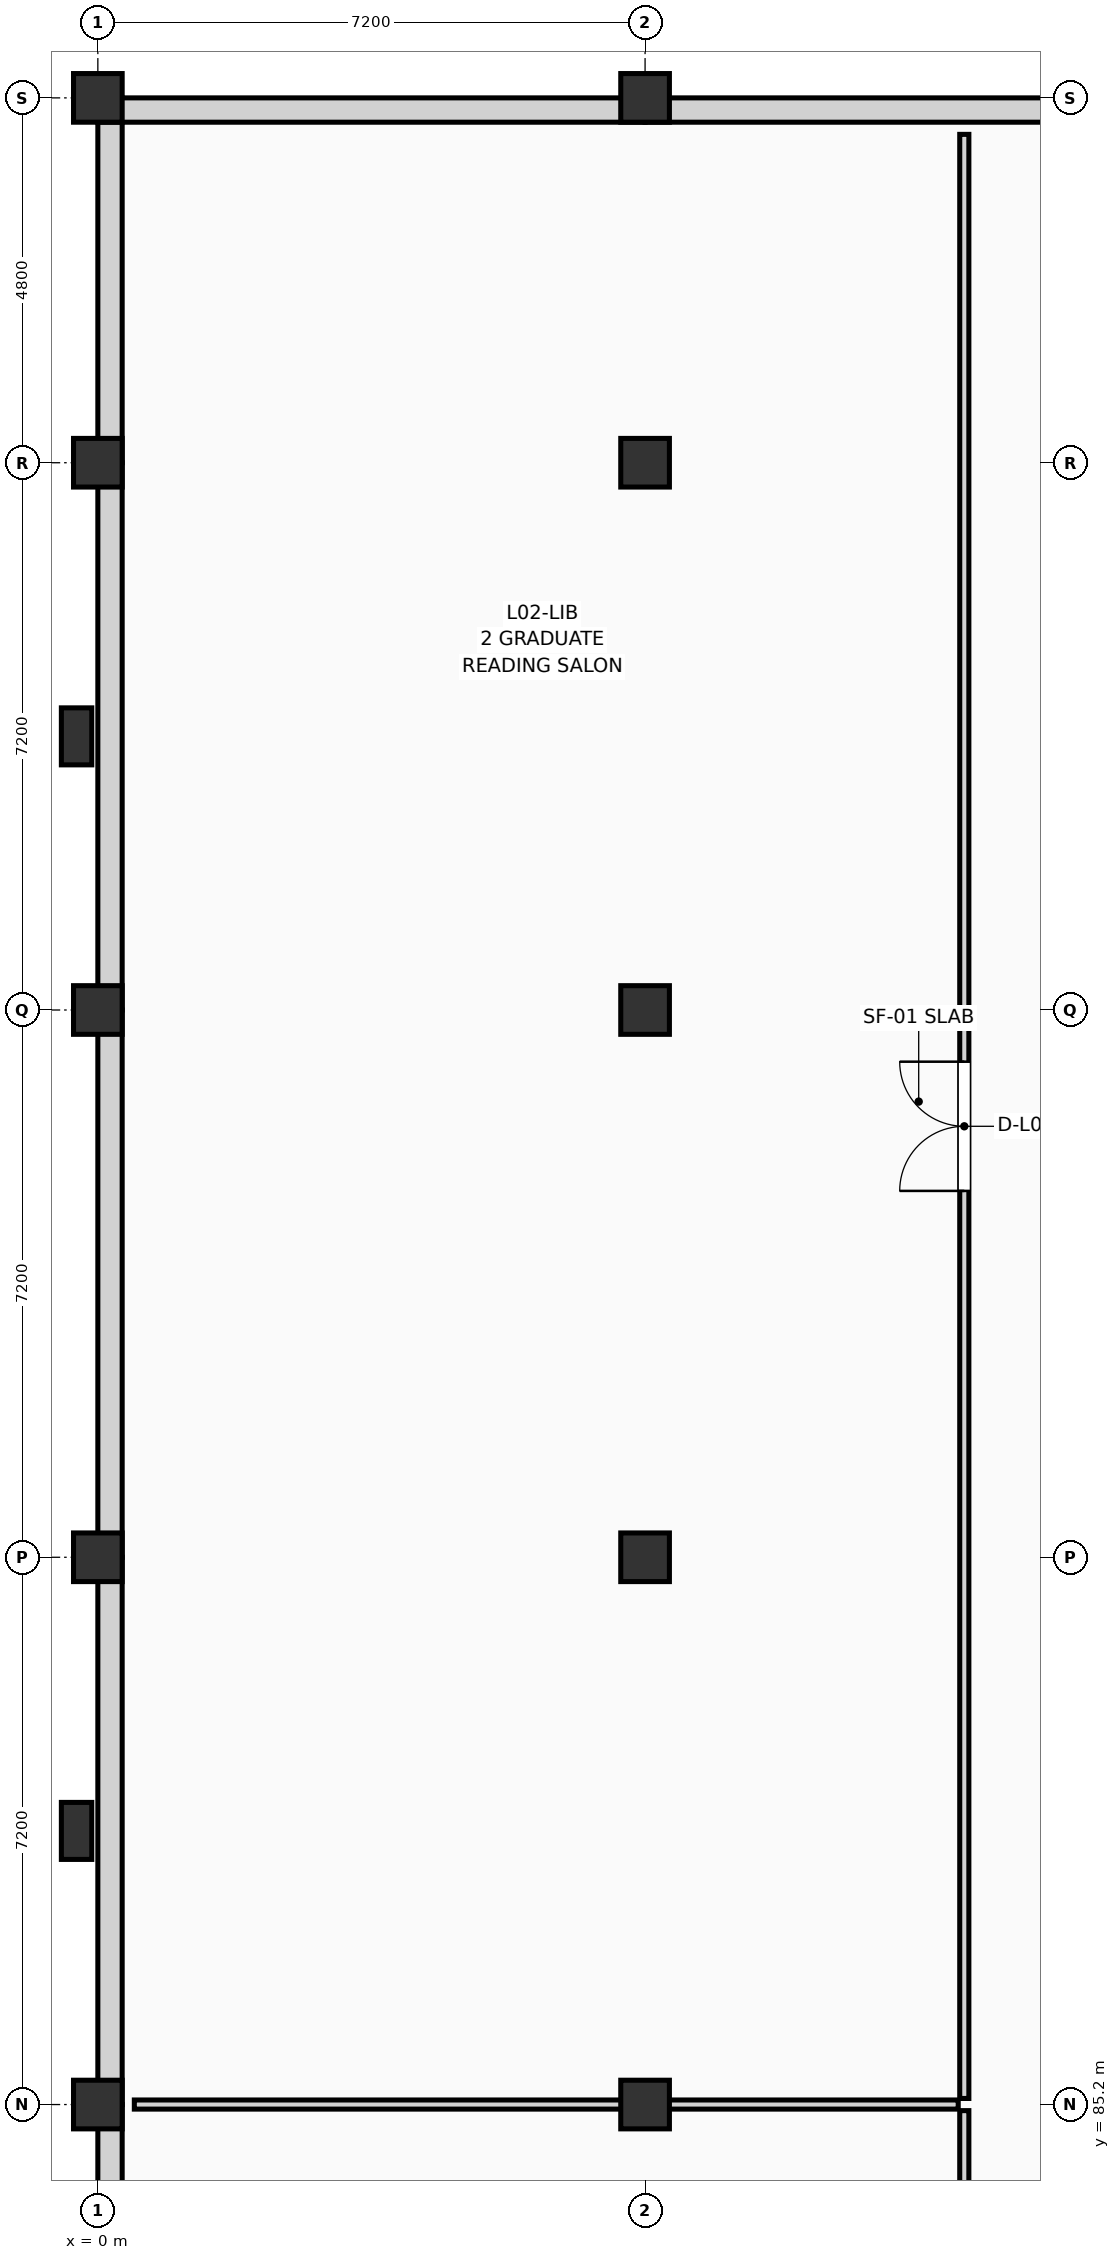
"""IFC4 building model, lengths in metres.
Left out: names, types, materials, properties, quantities, classifications, styles, units other than length and angle.
Written with IfcOpenShell. Run it as: python <this file> out.ifc"""

import sys

from ifc_helpers import new_model, si_unit, direction, frame, frame_2d, origin, origin_2d, place, context, subcontext, project, spatial, rectangle, extrude, element, fill, save


model = new_model("IFC4")
c1 = context("Model", 3, precision=1e-05, world=origin(), true_north=direction((0.0, 1.0)))
c2 = subcontext(c1, "Body", "Model", "MODEL_VIEW")
j1 = project(units=[si_unit("LENGTHUNIT", "METRE"), si_unit("PLANEANGLEUNIT", "RADIAN")], contexts=[c1])
p1 = place(None, origin())
s1 = spatial("IfcSite", under=j1, at=p1, CompositionType="ELEMENT")
p2 = place(p1, origin())
s2 = spatial("IfcBuilding", under=s1, at=p2, CompositionType="ELEMENT")
p3 = place(p2, frame((0.0, 0.0, 8.55)))
s3 = spatial("IfcBuildingStorey", under=s2, at=p3, CompositionType="ELEMENT", Elevation=8.55)
for number, where, z_axis, x_axis in (
    (1, (0.0, 85.2, 0.0), (0.0, 0.0, 1.0), (1.0, 0.0, 0.0)),
    (2, (0.0, 92.4, 0.0), (0.0, 0.0, 1.0), (1.0, 0.0, 0.0)),
    (3, (0.0, 99.6, 0.0), (0.0, 0.0, 1.0), (1.0, 0.0, 0.0)),
    (4, (0.0, 106.8, 0.0), (0.0, 0.0, 1.0), (1.0, 0.0, 0.0)),
    (5, (0.0, 111.6, 0.0), (0.0, 0.0, 1.0), (1.0, 0.0, 0.0)),
    (6, (7.2, 85.2, 0.0), (0.0, 0.0, 1.0), (1.0, 0.0, 0.0)),
    (7, (7.2, 92.4, 0.0), (0.0, 0.0, 1.0), (1.0, 0.0, 0.0)),
    (8, (7.2, 99.6, 0.0), (0.0, 0.0, 1.0), (1.0, 0.0, 0.0)),
    (9, (7.2, 106.8, 0.0), (0.0, 0.0, 1.0), (1.0, 0.0, 0.0)),
    (10, (7.2, 111.6, 0.0), (0.0, 0.0, 1.0), (1.0, 0.0, 0.0)),
):
    element("IfcColumn", number, at=place(p3, frame(where, z_axis=z_axis, x_axis=x_axis)), inside=s3, PredefinedType="COLUMN", context=c2, shape_type="SweptSolid", body=[
        extrude(rectangle(XDim=0.64, YDim=0.64, at=origin_2d()), origin(), (0.0, 0.0, 1.0), 3.6),
    ])
for number, where, z_axis, x_axis in (
    (11, (-0.28, 88.8, 0.0), (0.0, 0.0, 1.0), (1.0, 0.0, 0.0)),
    (12, (-0.28, 103.2, 0.0), (0.0, 0.0, 1.0), (1.0, 0.0, 0.0)),
):
    element("IfcColumn", number, at=place(p3, frame(where, z_axis=z_axis, x_axis=x_axis)), inside=s3, PredefinedType="PILASTER", context=c2, shape_type="SweptSolid", body=[
        extrude(rectangle(XDim=0.4, YDim=0.75, at=origin_2d()), origin(), (0.0, 0.0, 1.0), 3.6),
    ])
for number, where, z_axis, x_axis in (
    (13, (0.16, 78.0, 0.0), (0.0, 0.0, 1.0), (0.0, 1.0, 0.0)),
    (14, (0.16, 85.2, 0.0), (0.0, 0.0, 1.0), (0.0, 1.0, 0.0)),
):
    element("IfcWall", number, at=place(p3, frame(where, z_axis=z_axis, x_axis=x_axis)), inside=s3, PredefinedType="SOLIDWALL", context=c2, shape_type="SweptSolid", body=[
        extrude(rectangle(XDim=7.2, YDim=0.32, at=frame_2d((3.6, 0.0))), origin(), (0.0, 0.0, 1.0), 2.84),
    ])
p4 = place(p3, frame((0.16, 92.4, 0.0), z_axis=(0.0, 0.0, 1.0), x_axis=(0.0, 1.0, 0.0)))
e15 = element("IfcWall", 15, at=p4, inside=s3, PredefinedType="SOLIDWALL", context=c2, shape_type="SweptSolid", body=[
    extrude(rectangle(XDim=7.2, YDim=0.32, at=frame_2d((3.6, 0.0))), origin(), (0.0, 0.0, 1.0), 2.84),
])
p5 = place(p3, frame((0.16, 99.6, 0.0), z_axis=(0.0, 0.0, 1.0), x_axis=(0.0, 1.0, 0.0)))
e16 = element("IfcWall", 16, at=p5, inside=s3, PredefinedType="SOLIDWALL", context=c2, shape_type="SweptSolid", body=[
    extrude(rectangle(XDim=7.2, YDim=0.32, at=frame_2d((3.6, 0.0))), origin(), (0.0, 0.0, 1.0), 2.84),
])
p6 = place(p3, frame((0.16, 106.8, 0.0), z_axis=(0.0, 0.0, 1.0), x_axis=(0.0, 1.0, 0.0)))
e17 = element("IfcWall", 17, at=p6, inside=s3, PredefinedType="SOLIDWALL", context=c2, shape_type="SweptSolid", body=[
    extrude(rectangle(XDim=4.8, YDim=0.32, at=frame_2d((2.4, 0.0))), origin(), (0.0, 0.0, 1.0), 2.84),
])
for number, where, z_axis, x_axis in (
    (18, (0.0, 111.44, 0.0), (0.0, 0.0, 1.0), (1.0, 0.0, 0.0)),
    (19, (7.2, 111.44, 0.0), (0.0, 0.0, 1.0), (1.0, 0.0, 0.0)),
):
    element("IfcWall", number, at=place(p3, frame(where, z_axis=z_axis, x_axis=x_axis)), inside=s3, PredefinedType="SOLIDWALL", context=c2, shape_type="SweptSolid", body=[
        extrude(rectangle(XDim=7.2, YDim=0.32, at=frame_2d((3.6, 0.0))), origin(), (0.0, 0.0, 1.0), 2.84),
    ])
p7 = place(p3, frame((11.4, 56.68, 0.0), z_axis=(0.0, 0.0, 1.0), x_axis=(0.0, 1.0, 0.0)))
e20 = element("IfcWall", 20, at=p7, inside=s3, PredefinedType="PARTITIONING", context=c2, shape_type="SweptSolid", body=[
    extrude(rectangle(XDim=28.44, YDim=0.12, at=frame_2d((14.22, 0.0))), origin(), (0.0, 0.0, 1.0), 3.375),
])
p8 = place(p7, frame((13.37, 0.0, 0.0)))
e21 = element("IfcOpeningElement", 21, at=p8, cuts=e20, PredefinedType="OPENING", context=c2, shape_type="SweptSolid", body=[
    extrude(rectangle(XDim=1.7, YDim=2.28, at=frame_2d((0.85, 1.14))), frame((0.0, 0.072, 0.0), z_axis=(0.0, -1.0, 0.0), x_axis=(1.0, 0.0, 0.0)), (0.0, 0.0, 1.0), 0.144),
])
p9 = place(p3, frame((0.48, 85.2, 0.0), z_axis=(0.0, 0.0, 1.0), x_axis=(1.0, 0.0, 0.0)))
e22 = element("IfcWall", 22, at=p9, inside=s3, PredefinedType="PARTITIONING", context=c2, shape_type="SweptSolid", body=[
    extrude(rectangle(XDim=10.84, YDim=0.12, at=frame_2d((5.42, 0.0))), origin(), (0.0, 0.0, 1.0), 2.595),
])
p10 = place(p3, frame((11.4, 85.28, 0.0), z_axis=(0.0, 0.0, 1.0), x_axis=(0.0, 1.0, 0.0)))
e23 = element("IfcWall", 23, at=p10, inside=s3, PredefinedType="PARTITIONING", context=c2, shape_type="SweptSolid", body=[
    extrude(rectangle(XDim=25.84, YDim=0.12, at=frame_2d((12.92, 0.0))), origin(), (0.0, 0.0, 1.0), 3.375),
])
p11 = place(p10, frame((11.94, 0.0, 0.0)))
e24 = element("IfcOpeningElement", 24, at=p11, cuts=e23, PredefinedType="OPENING", context=c2, shape_type="SweptSolid", body=[
    extrude(rectangle(XDim=1.7, YDim=2.28, at=frame_2d((0.85, 1.14))), frame((0.0, 0.072, 0.0), z_axis=(0.0, -1.0, 0.0), x_axis=(1.0, 0.0, 0.0)), (0.0, 0.0, 1.0), 0.144),
])
p12 = place(p11, origin())
e25 = element("IfcDoor", 25, at=p12, inside=s3, OperationType="DOUBLE_DOOR_SINGLE_SWING", PredefinedType="DOOR", context=c2, shape_type="SweptSolid", body=[
    extrude(rectangle(XDim=1.7, YDim=2.28, at=frame_2d((0.85, 1.14))), frame((0.0, 0.025, 0.0), z_axis=(0.0, -1.0, 0.0), x_axis=(1.0, 0.0, 0.0)), (0.0, 0.0, 1.0), 0.05),
])
fill(e24, e25)
save(model, sys.argv[1])
